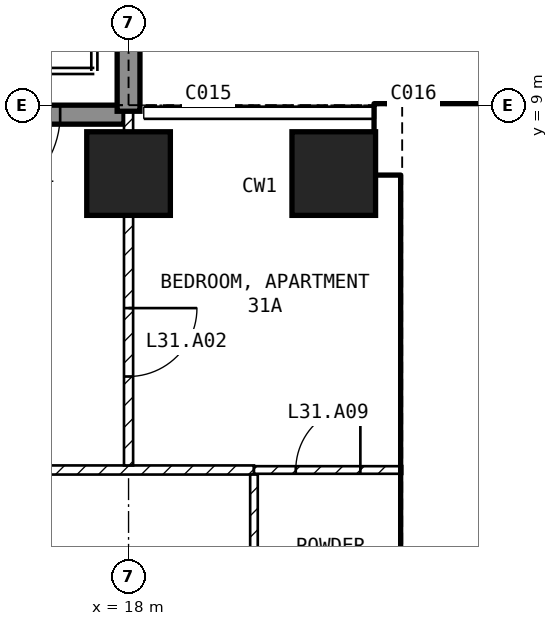
"""IFC4 building model, lengths in metres.
Left out: names, types, materials, properties, quantities, classifications, styles, units other than length and angle.
Written with IfcOpenShell. Run it as: python <this file> out.ifc"""

import sys

from ifc_helpers import new_model, si_unit, direction, frame, frame_2d, origin, origin_2d, place, context, subcontext, project, spatial, rectangle, extrude, element, fill, save


model = new_model("IFC4")
c1 = context("Model", 3, precision=1e-05, world=origin(), true_north=direction((0.0, 1.0)))
c2 = subcontext(c1, "Body", "Model", "MODEL_VIEW")
j1 = project(units=[si_unit("LENGTHUNIT", "METRE"), si_unit("PLANEANGLEUNIT", "RADIAN")], contexts=[c1])
p1 = place(None, origin())
s1 = spatial("IfcSite", under=j1, at=p1, CompositionType="ELEMENT")
p2 = place(p1, origin())
s2 = spatial("IfcBuilding", under=s1, at=p2, CompositionType="ELEMENT")
p3 = place(p2, frame((0.0, 0.0, 130.4)))
s3 = spatial("IfcBuildingStorey", under=s2, at=p3, CompositionType="ELEMENT", Elevation=130.4)
for number, where, z_axis, x_axis in (
    (1, (18.0, 8.1, -0.25), (0.0, 0.0, 1.0), (1.0, 0.0, 0.0)),
    (2, (20.7, 8.1, -0.25), (0.0, 0.0, 1.0), (1.0, 0.0, 0.0)),
):
    element("IfcColumn", number, at=place(p3, frame(where, z_axis=z_axis, x_axis=x_axis)), inside=s3, PredefinedType="COLUMN", context=c2, shape_type="SweptSolid", body=[
        extrude(rectangle(XDim=1.1, YDim=1.1, at=origin_2d()), origin(), (0.0, 0.0, 1.0), 3.5),
    ])
p4 = place(p3, frame((17.94, 8.875, 0.0), z_axis=(0.0, 0.0, 1.0), x_axis=(-1.0, 0.0, 0.0)))
e3 = element("IfcWall", 3, at=p4, inside=s3, PredefinedType="SOLIDWALL", context=c2, shape_type="SweptSolid", body=[
    extrude(rectangle(XDim=2.29, YDim=0.25, at=frame_2d((1.145, 0.0))), origin(), (0.0, 0.0, 1.0), 3.25),
])
p5 = place(p4, frame((0.84, 0.0, 0.0)))
e4 = element("IfcOpeningElement", 4, at=p5, cuts=e3, PredefinedType="OPENING", context=c2, shape_type="SweptSolid", body=[
    extrude(rectangle(XDim=1.2, YDim=2.4, at=frame_2d((0.6, 1.2))), frame((0.0, 0.135, 0.0), z_axis=(0.0, -1.0, 0.0), x_axis=(1.0, 0.0, 0.0)), (0.0, 0.0, 1.0), 0.27),
])
p6 = place(p3, frame((18.0, 8.92, 0.0), z_axis=(0.0, 0.0, 1.0), x_axis=(0.0, 1.0, 0.0)))
e5 = element("IfcWall", 5, at=p6, inside=s3, PredefinedType="SOLIDWALL", context=c2, shape_type="SweptSolid", body=[
    extrude(rectangle(XDim=2.82, YDim=0.3, at=frame_2d((1.41, 0.0))), origin(), (0.0, 0.0, 1.0), 3.25),
])
p7 = place(p3, frame((21.25, 8.55, 0.0), z_axis=(0.0, 0.0, 1.0), x_axis=(1.0, 0.0, 0.0)))
e6 = element("IfcWall", 6, at=p7, inside=s3, PredefinedType="SHEAR", context=c2, shape_type="SweptSolid", body=[
    extrude(rectangle(XDim=8.2, YDim=0.9, at=frame_2d((4.1, 0.0))), origin(), (0.0, 0.0, 1.0), 3.25),
])
p8 = place(p3, frame((21.825, 1.2, 0.0), z_axis=(0.0, 0.0, 1.0), x_axis=(0.0, 1.0, 0.0)))
e7 = element("IfcWall", 7, at=p8, inside=s3, PredefinedType="SHEAR", context=c2, shape_type="SweptSolid", body=[
    extrude(rectangle(XDim=6.9, YDim=0.45, at=frame_2d((3.45, 0.0))), origin(), (0.0, 0.0, 1.0), 3.25),
])
p9 = place(p3, frame((22.05, 5.15, 0.0), z_axis=(0.0, 0.0, 1.0), x_axis=(1.0, 0.0, 0.0)))
e8 = element("IfcWall", 8, at=p9, inside=s3, PredefinedType="SOLIDWALL", context=c2, shape_type="SweptSolid", body=[
    extrude(rectangle(XDim=6.3, YDim=0.2, at=frame_2d((3.15, 0.0))), origin(), (0.0, 0.0, 1.0), 3.25),
])
p10 = place(p9, frame((0.2, 0.0, 0.0)))
e9 = element("IfcOpeningElement", 9, at=p10, cuts=e8, PredefinedType="OPENING", context=c2, shape_type="SweptSolid", body=[
    extrude(rectangle(XDim=1.0, YDim=2.1, at=frame_2d((0.5, 1.05))), frame((0.0, 0.11, 0.0), z_axis=(0.0, -1.0, 0.0), x_axis=(1.0, 0.0, 0.0)), (0.0, 0.0, 1.0), 0.22),
])
p11 = place(p3, frame((8.94, 4.2, 0.0), z_axis=(0.0, 0.0, 1.0), x_axis=(1.0, 0.0, 0.0)))
e10 = element("IfcWall", 10, at=p11, inside=s3, PredefinedType="PARTITIONING", context=c2, shape_type="SweptSolid", body=[
    extrude(rectangle(XDim=10.71, YDim=0.12, at=frame_2d((5.355, 0.0))), origin(), (0.0, 0.0, 1.0), 3.25),
])
p12 = place(p11, frame((3.96, 0.0, 0.0)))
e11 = element("IfcOpeningElement", 11, at=p12, cuts=e10, PredefinedType="OPENING", context=c2, shape_type="SweptSolid", body=[
    extrude(rectangle(XDim=0.9, YDim=2.1, at=frame_2d((0.45, 1.05))), frame((0.0, 0.07, 0.0), z_axis=(0.0, -1.0, 0.0), x_axis=(1.0, 0.0, 0.0)), (0.0, 0.0, 1.0), 0.14),
])
p13 = place(p3, frame((19.65, 4.14, 0.0), z_axis=(0.0, 0.0, 1.0), x_axis=(0.0, -1.0, 0.0)))
e12 = element("IfcWall", 12, at=p13, inside=s3, PredefinedType="PARTITIONING", context=c2, shape_type="SweptSolid", body=[
    extrude(rectangle(XDim=2.84, YDim=0.1, at=frame_2d((1.42, 0.0))), origin(), (0.0, 0.0, 1.0), 3.25),
])
p14 = place(p3, frame((19.65, 4.2, 0.0), z_axis=(0.0, 0.0, 1.0), x_axis=(1.0, 0.0, 0.0)))
e13 = element("IfcWall", 13, at=p14, inside=s3, PredefinedType="PARTITIONING", context=c2, shape_type="SweptSolid", body=[
    extrude(rectangle(XDim=1.95, YDim=0.1, at=frame_2d((0.975, 0.0))), origin(), (0.0, 0.0, 1.0), 3.25),
])
p15 = place(p14, frame((0.55, 0.0, 0.0)))
e14 = element("IfcOpeningElement", 14, at=p15, cuts=e13, PredefinedType="OPENING", context=c2, shape_type="SweptSolid", body=[
    extrude(rectangle(XDim=0.85, YDim=2.1, at=frame_2d((0.425, 1.05))), frame((0.0, 0.06, 0.0), z_axis=(0.0, -1.0, 0.0), x_axis=(1.0, 0.0, 0.0)), (0.0, 0.0, 1.0), 0.12),
])
p16 = place(p3, frame((18.0, 8.92, 0.0), z_axis=(0.0, 0.0, 1.0), x_axis=(0.0, -1.0, 0.0)))
e15 = element("IfcWall", 15, at=p16, inside=s3, PredefinedType="PARTITIONING", context=c2, shape_type="SweptSolid", body=[
    extrude(rectangle(XDim=4.66, YDim=0.12, at=frame_2d((2.33, 0.0))), origin(), (0.0, 0.0, 1.0), 2.414),
])
p17 = place(p16, frame((2.59, 0.0, 0.0)))
e16 = element("IfcOpeningElement", 16, at=p17, cuts=e15, PredefinedType="OPENING", context=c2, shape_type="SweptSolid", body=[
    extrude(rectangle(XDim=0.9, YDim=2.1, at=frame_2d((0.45, 1.05))), frame((0.0, 0.07, 0.0), z_axis=(0.0, -1.0, 0.0), x_axis=(1.0, 0.0, 0.0)), (0.0, 0.0, 1.0), 0.14),
])
p18 = place(p5, origin())
e17 = element("IfcDoor", 17, at=p18, inside=s3, OperationType="SINGLE_SWING_RIGHT", PredefinedType="DOOR", context=c2, shape_type="SweptSolid", body=[
    extrude(rectangle(XDim=1.2, YDim=2.4, at=frame_2d((0.6, 1.2))), frame((0.0, 0.025, 0.0), z_axis=(0.0, -1.0, 0.0), x_axis=(1.0, 0.0, 0.0)), (0.0, 0.0, 1.0), 0.05),
])
fill(e4, e17)
p19 = place(p10, origin())
e18 = element("IfcDoor", 18, at=p19, inside=s3, OperationType="SINGLE_SWING_LEFT", PredefinedType="DOOR", context=c2, shape_type="SweptSolid", body=[
    extrude(rectangle(XDim=1.0, YDim=2.1, at=frame_2d((0.5, 1.05))), frame((0.0, 0.025, 0.0), z_axis=(0.0, -1.0, 0.0), x_axis=(1.0, 0.0, 0.0)), (0.0, 0.0, 1.0), 0.05),
])
fill(e9, e18)
p20 = place(p17, origin())
e19 = element("IfcDoor", 19, at=p20, inside=s3, OperationType="SINGLE_SWING_LEFT", PredefinedType="DOOR", context=c2, shape_type="SweptSolid", body=[
    extrude(rectangle(XDim=0.9, YDim=2.1, at=frame_2d((0.45, 1.05))), frame((0.0, 0.025, 0.0), z_axis=(0.0, -1.0, 0.0), x_axis=(1.0, 0.0, 0.0)), (0.0, 0.0, 1.0), 0.05),
])
fill(e16, e19)
p21 = place(p15, origin())
e20 = element("IfcDoor", 20, at=p21, inside=s3, OperationType="SINGLE_SWING_RIGHT", PredefinedType="DOOR", context=c2, shape_type="SweptSolid", body=[
    extrude(rectangle(XDim=0.85, YDim=2.1, at=frame_2d((0.425, 1.05))), frame((0.0, 0.025, 0.0), z_axis=(0.0, -1.0, 0.0), x_axis=(1.0, 0.0, 0.0)), (0.0, 0.0, 1.0), 0.05),
])
fill(e14, e20)
save(model, sys.argv[1])
